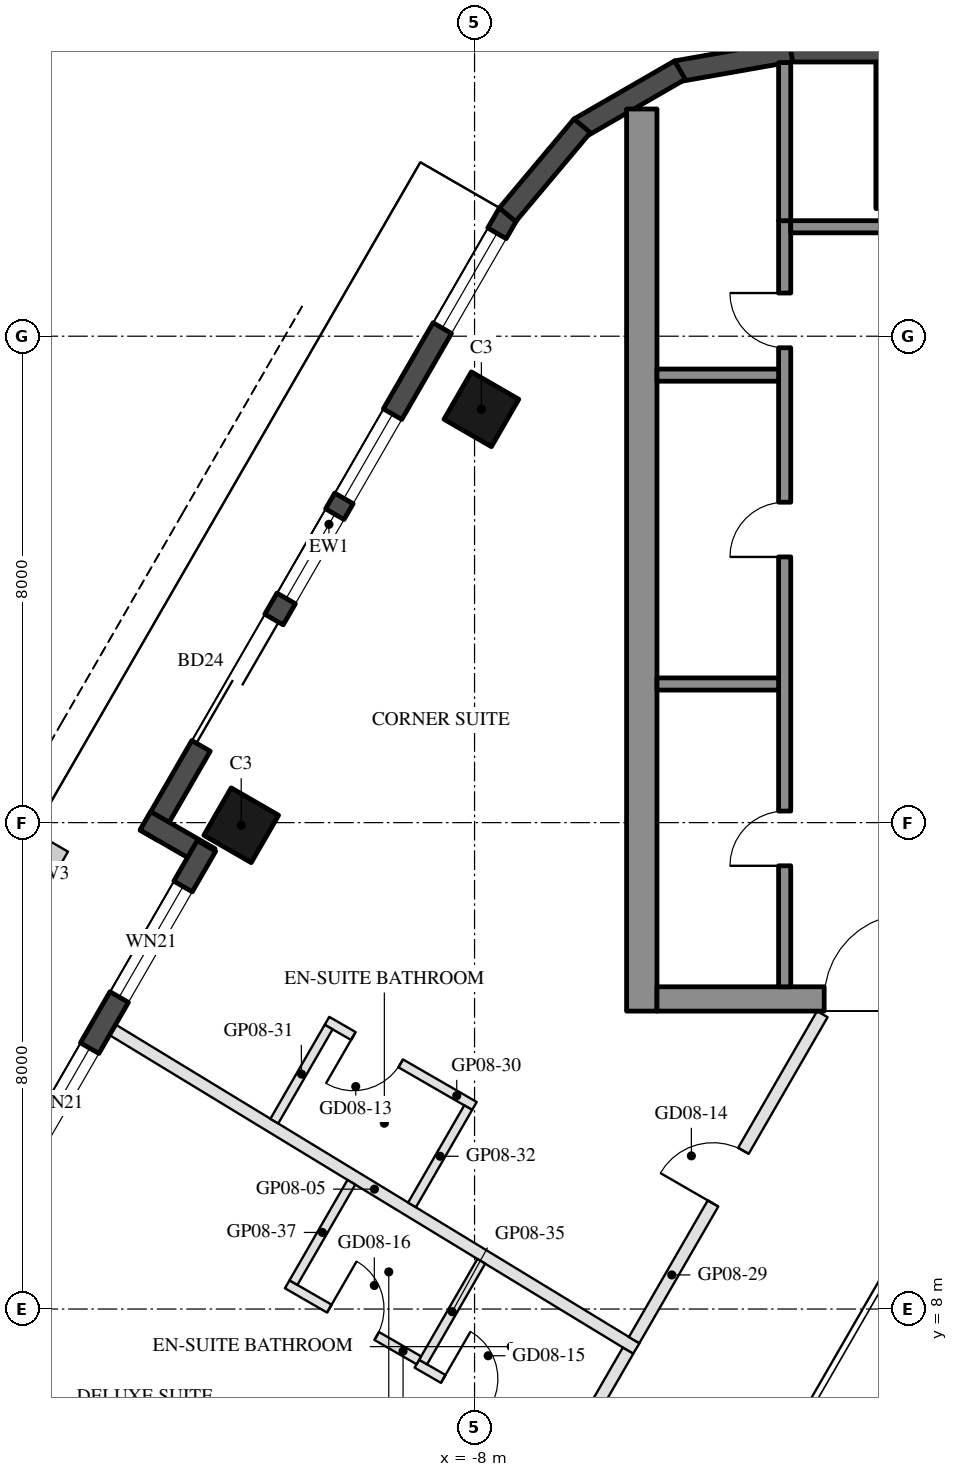
"""IFC4 building model, lengths in metres.
Left out: names, types, materials, properties, quantities, classifications, styles, units other than length and angle.
Written with IfcOpenShell. Run it as: python <this file> out.ifc"""

import sys

from ifc_helpers import new_model, si_unit, direction, frame, frame_2d, origin, origin_2d, place, context, subcontext, project, spatial, rectangle, hollow_rectangle, extrude, element, fill, save


model = new_model("IFC4")
c1 = context("Model", 3, precision=1e-05, world=origin(), true_north=direction((0.0, 1.0)))
c2 = subcontext(c1, "Body", "Model", "MODEL_VIEW")
j1 = project(units=[si_unit("LENGTHUNIT", "METRE"), si_unit("PLANEANGLEUNIT", "RADIAN")], contexts=[c1])
p1 = place(None, origin())
s1 = spatial("IfcSite", under=j1, at=p1, CompositionType="ELEMENT")
p2 = place(p1, origin())
s2 = spatial("IfcBuilding", under=s1, at=p2, CompositionType="ELEMENT")
p3 = place(p2, frame((0.0, 0.0, 102.0)))
s3 = spatial("IfcBuildingStorey", under=s2, at=p3, CompositionType="ELEMENT", Elevation=102.0)
for number, where, z_axis, x_axis in (
    (1, (-7.888, 22.798, 0.0), (0.0, 0.0, 1.0), (0.5, 0.866, 0.0)),
    (2, (-11.838, 15.957, 0.0), (0.0, 0.0, 1.0), (0.5, 0.866, 0.0)),
):
    element("IfcColumn", number, at=place(p3, frame(where, z_axis=z_axis, x_axis=x_axis)), inside=s3, PredefinedType="COLUMN", context=c2, shape_type="SweptSolid", body=[
        extrude(hollow_rectangle(XDim=0.9, YDim=0.9, WallThickness=0.04, at=origin_2d()), origin(), (0.0, 0.0, 1.0), 3.7),
    ])
p4 = place(p3, frame((0.0, 27.3, 0.0), z_axis=(0.0, 0.0, 1.0), x_axis=(1.0, 0.0, 0.0)))
e3 = element("IfcColumn", 3, at=p4, inside=s3, PredefinedType="COLUMN", context=c2, shape_type="SweptSolid", body=[
    extrude(hollow_rectangle(XDim=2.8, YDim=2.4, WallThickness=0.07, at=origin_2d()), origin(), (0.0, 0.0, 1.0), 3.7),
])
p5 = place(p3, frame((-7.441, 26.022, 0.0), z_axis=(0.0, 0.0, 1.0), x_axis=(-0.499992533062, -0.86602971478, 0.0)))
e4 = element("IfcWall", 4, at=p5, inside=s3, PredefinedType="SOLIDWALL", context=c2, shape_type="SweptSolid", body=[
    extrude(rectangle(XDim=11.816, YDim=0.35, at=frame_2d((5.908, 0.0))), origin(), (0.0, 0.0, 1.0), 3.55),
])
p6 = place(p5, frame((0.381, 0.0, 0.3)))
e5 = element("IfcOpeningElement", 5, at=p6, cuts=e4, PredefinedType="OPENING", context=c2, shape_type="SweptSolid", body=[
    extrude(rectangle(XDim=1.8, YDim=2.65, at=frame_2d((0.9, 1.325))), frame((0.0, 0.185, 0.0), z_axis=(0.0, -1.0, 0.0), x_axis=(1.0, 0.0, 0.0)), (0.0, 0.0, 1.0), 0.37),
])
p7 = place(p5, frame((7.716, 0.0, 0.0)))
e6 = element("IfcOpeningElement", 6, at=p7, cuts=e4, PredefinedType="OPENING", context=c2, shape_type="SweptSolid", body=[
    extrude(rectangle(XDim=2.4, YDim=2.4, at=frame_2d((1.2, 1.2))), frame((0.0, 0.185, 0.0), z_axis=(0.0, -1.0, 0.0), x_axis=(1.0, 0.0, 0.0)), (0.0, 0.0, 1.0), 0.37),
])
p8 = place(p5, frame((3.815, 0.0, 0.3)))
e7 = element("IfcOpeningElement", 7, at=p8, cuts=e4, PredefinedType="OPENING", context=c2, shape_type="SweptSolid", body=[
    extrude(rectangle(XDim=1.6, YDim=2.65, at=frame_2d((0.8, 1.325))), frame((0.0, 0.185, 0.0), z_axis=(0.0, -1.0, 0.0), x_axis=(1.0, 0.0, 0.0)), (0.0, 0.0, 1.0), 0.37),
])
p9 = place(p5, frame((5.715, 0.0, 0.3)))
e8 = element("IfcOpeningElement", 8, at=p9, cuts=e4, PredefinedType="OPENING", context=c2, shape_type="SweptSolid", body=[
    extrude(rectangle(XDim=1.6, YDim=2.65, at=frame_2d((0.8, 1.325))), frame((0.0, 0.185, 0.0), z_axis=(0.0, -1.0, 0.0), x_axis=(1.0, 0.0, 0.0)), (0.0, 0.0, 1.0), 0.37),
])
p10 = place(p3, frame((-13.413, 16.029, 0.0), z_axis=(0.0, 0.0, 1.0), x_axis=(0.866005645448, -0.500034220881, 0.0)))
e9 = element("IfcWall", 9, at=p10, inside=s3, PredefinedType="SOLIDWALL", context=c2, shape_type="SweptSolid", body=[
    extrude(rectangle(XDim=1.22, YDim=0.35, at=frame_2d((0.61, 0.0))), origin(), (0.0, 0.0, 1.0), 3.55),
])
p11 = place(p3, frame((-12.409, 15.617, 0.0), z_axis=(0.0, 0.0, 1.0), x_axis=(-0.500003597184, -0.866023326939, 0.0)))
e10 = element("IfcWall", 10, at=p11, inside=s3, PredefinedType="SOLIDWALL", context=c2, shape_type="SweptSolid", body=[
    extrude(rectangle(XDim=6.74, YDim=0.35, at=frame_2d((3.37, 0.0))), origin(), (0.0, 0.0, 1.0), 3.55),
])
p12 = place(p11, frame((0.77, 0.0, 0.3)))
e11 = element("IfcOpeningElement", 11, at=p12, cuts=e10, PredefinedType="OPENING", context=c2, shape_type="SweptSolid", body=[
    extrude(rectangle(XDim=2.1, YDim=2.65, at=frame_2d((1.05, 1.325))), frame((0.0, 0.185, 0.0), z_axis=(0.0, -1.0, 0.0), x_axis=(1.0, 0.0, 0.0)), (0.0, 0.0, 1.0), 0.37),
])
p13 = place(p11, frame((3.841, 0.0, 0.3)))
e12 = element("IfcOpeningElement", 12, at=p13, cuts=e10, PredefinedType="OPENING", context=c2, shape_type="SweptSolid", body=[
    extrude(rectangle(XDim=2.1, YDim=2.65, at=frame_2d((1.05, 1.325))), frame((0.0, 0.185, 0.0), z_axis=(0.0, -1.0, 0.0), x_axis=(1.0, 0.0, 0.0)), (0.0, 0.0, 1.0), 0.37),
])
p14 = place(p3, frame((2.829, 28.685, 0.0), z_axis=(0.0, 0.0, 1.0), x_axis=(-1.0, 0.0, 0.0)))
e13 = element("IfcWall", 13, at=p14, inside=s3, PredefinedType="SOLIDWALL", context=c2, shape_type="SweptSolid", body=[
    extrude(rectangle(XDim=5.658, YDim=0.35, at=frame_2d((2.829, 0.0))), origin(), (0.0, 0.0, 1.0), 3.55),
])
for number, where, z_axis, x_axis in (
    (14, (-2.799, 28.688, 0.0), (0.0, 0.0, 1.0), (-0.985, -0.174, 0.0)),
    (15, (-4.623, 28.377, 0.0), (0.0, 0.0, 1.0), (-0.866, -0.5, 0.0)),
):
    element("IfcWall", number, at=place(p3, frame(where, z_axis=z_axis, x_axis=x_axis)), inside=s3, PredefinedType="SOLIDWALL", context=c2, shape_type="SweptSolid", body=[
        extrude(rectangle(XDim=1.91, YDim=0.35, at=frame_2d((0.955, 0.0))), origin(), (0.0, 0.0, 1.0), 3.55),
    ])
p15 = place(p3, frame((-6.23, 27.461, 0.0), z_axis=(0.0, 0.0, 1.0), x_axis=(-0.642808304945, -0.766027077259, 0.0)))
e16 = element("IfcWall", 16, at=p15, inside=s3, PredefinedType="SOLIDWALL", context=c2, shape_type="SweptSolid", body=[
    extrude(rectangle(XDim=1.91, YDim=0.35, at=frame_2d((0.955, 0.0))), origin(), (0.0, 0.0, 1.0), 3.55),
])
p16 = place(p3, frame((-5.25, 12.9, 0.0), z_axis=(0.0, 0.0, 1.0), x_axis=(0.0, 1.0, 0.0)))
e17 = element("IfcWall", 17, at=p16, inside=s3, PredefinedType="SHEAR", context=c2, shape_type="SweptSolid", body=[
    extrude(rectangle(XDim=14.837, YDim=0.5, at=frame_2d((7.418, 0.0))), origin(), (0.0, 0.0, 1.0), 3.5),
])
p17 = place(p3, frame((5.0, 13.1, 0.0), z_axis=(0.0, 0.0, 1.0), x_axis=(-1.0, 0.0, 0.0)))
e18 = element("IfcWall", 18, at=p17, inside=s3, PredefinedType="SHEAR", context=c2, shape_type="SweptSolid", body=[
    extrude(rectangle(XDim=10.0, YDim=0.4, at=frame_2d((5.0, 0.0))), origin(), (0.0, 0.0, 1.0), 3.5),
])
p18 = place(p17, frame((3.55, 0.0, 0.0)))
e19 = element("IfcOpeningElement", 19, at=p18, cuts=e18, PredefinedType="OPENING", context=c2, shape_type="SweptSolid", body=[
    extrude(rectangle(XDim=1.1, YDim=2.1, at=frame_2d((0.55, 1.05))), frame((0.0, 0.21, 0.0), z_axis=(0.0, -1.0, 0.0), x_axis=(1.0, 0.0, 0.0)), (0.0, 0.0, 1.0), 0.42),
])
p19 = place(p17, frame((5.85, 0.0, 0.0)))
e20 = element("IfcOpeningElement", 20, at=p19, cuts=e18, PredefinedType="OPENING", context=c2, shape_type="SweptSolid", body=[
    extrude(rectangle(XDim=1.4, YDim=2.1, at=frame_2d((0.7, 1.05))), frame((0.0, 0.21, 0.0), z_axis=(0.0, -1.0, 0.0), x_axis=(1.0, 0.0, 0.0)), (0.0, 0.0, 1.0), 0.42),
])
p20 = place(p3, frame((-2.9, 13.3, 0.0), z_axis=(0.0, 0.0, 1.0), x_axis=(0.0, 1.0, 0.0)))
e21 = element("IfcWall", 21, at=p20, inside=s3, PredefinedType="SHEAR", context=c2, shape_type="SweptSolid", body=[
    extrude(rectangle(XDim=12.6, YDim=0.2, at=frame_2d((6.3, 0.0))), origin(), (0.0, 0.0, 1.0), 3.5),
])
p21 = place(p20, frame((1.99, 0.0, 0.0)))
e22 = element("IfcOpeningElement", 22, at=p21, cuts=e21, PredefinedType="OPENING", context=c2, shape_type="SweptSolid", body=[
    extrude(rectangle(XDim=0.9, YDim=2.1, at=frame_2d((0.45, 1.05))), frame((0.0, 0.11, 0.0), z_axis=(0.0, -1.0, 0.0), x_axis=(1.0, 0.0, 0.0)), (0.0, 0.0, 1.0), 0.22),
])
p22 = place(p20, frame((7.07, 0.0, 0.0)))
e23 = element("IfcOpeningElement", 23, at=p22, cuts=e21, PredefinedType="OPENING", context=c2, shape_type="SweptSolid", body=[
    extrude(rectangle(XDim=0.9, YDim=2.1, at=frame_2d((0.45, 1.05))), frame((0.0, 0.11, 0.0), z_axis=(0.0, -1.0, 0.0), x_axis=(1.0, 0.0, 0.0)), (0.0, 0.0, 1.0), 0.22),
])
p23 = place(p20, frame((10.51, 0.0, 0.0)))
e24 = element("IfcOpeningElement", 24, at=p23, cuts=e21, PredefinedType="OPENING", context=c2, shape_type="SweptSolid", body=[
    extrude(rectangle(XDim=0.9, YDim=2.1, at=frame_2d((0.45, 1.05))), frame((0.0, 0.11, 0.0), z_axis=(0.0, -1.0, 0.0), x_axis=(1.0, 0.0, 0.0)), (0.0, 0.0, 1.0), 0.22),
])
p24 = place(p3, frame((-0.4, 25.8, 0.0), z_axis=(0.0, 0.0, 1.0), x_axis=(-1.0, 0.0, 0.0)))
e25 = element("IfcWall", 25, at=p24, inside=s3, PredefinedType="SHEAR", context=c2, shape_type="SweptSolid", body=[
    extrude(rectangle(XDim=2.4, YDim=0.2, at=frame_2d((1.2, 0.0))), origin(), (0.0, 0.0, 1.0), 3.5),
])
for number, where, z_axis, x_axis in (
    (26, (-3.0, 18.28, 0.0), (0.0, 0.0, 1.0), (-1.0, 0.0, 0.0)),
    (27, (-3.0, 23.36, 0.0), (0.0, 0.0, 1.0), (-1.0, 0.0, 0.0)),
):
    element("IfcWall", number, at=place(p3, frame(where, z_axis=z_axis, x_axis=x_axis)), inside=s3, PredefinedType="SHEAR", context=c2, shape_type="SweptSolid", body=[
        extrude(rectangle(XDim=2.0, YDim=0.2, at=frame_2d((1.0, 0.0))), origin(), (0.0, 0.0, 1.0), 3.5),
    ])
p25 = place(p3, frame((-2.9, 25.9, 0.0), z_axis=(0.0, 0.0, 1.0), x_axis=(0.0, 1.0, 0.0)))
e28 = element("IfcWall", 28, at=p25, inside=s3, PredefinedType="SHEAR", context=c2, shape_type="SweptSolid", body=[
    extrude(rectangle(XDim=2.6, YDim=0.2, at=frame_2d((1.3, 0.0))), origin(), (0.0, 0.0, 1.0), 3.5),
])
p26 = place(p3, frame((-13.953, 12.593, 0.0), z_axis=(0.0, 0.0, 1.0), x_axis=(0.854198088033, -0.519947715065, 0.0)))
e29 = element("IfcWall", 29, at=p26, inside=s3, PredefinedType="PARTITIONING", context=c2, shape_type="SweptSolid", body=[
    extrude(rectangle(XDim=10.083, YDim=0.2, at=frame_2d((5.041, 0.0))), origin(), (0.0, 0.0, 1.0), 2.95),
])
p27 = place(p3, frame((-5.376, 7.489, 0.0), z_axis=(0.0, 0.0, 1.0), x_axis=(0.499998977725, 0.866025993994, 0.0)))
e30 = element("IfcWall", 30, at=p27, inside=s3, PredefinedType="PARTITIONING", context=c2, shape_type="SweptSolid", body=[
    extrude(rectangle(XDim=6.19, YDim=0.2, at=frame_2d((3.095, 0.0))), origin(), (0.0, 0.0, 1.0), 2.95),
])
p28 = place(p27, frame((2.595, 0.0, 0.0)))
e31 = element("IfcOpeningElement", 31, at=p28, cuts=e30, PredefinedType="OPENING", context=c2, shape_type="SweptSolid", body=[
    extrude(rectangle(XDim=1.0, YDim=2.1, at=frame_2d((0.5, 1.05))), frame((0.0, 0.11, 0.0), z_axis=(0.0, -1.0, 0.0), x_axis=(1.0, 0.0, 0.0)), (0.0, 0.0, 1.0), 0.22),
])
p29 = place(p3, frame((-8.002, 11.34, 0.0), z_axis=(0.0, 0.0, 1.0), x_axis=(-0.865996816683, 0.500049511043, 0.0)))
e32 = element("IfcWall", 32, at=p29, inside=s3, PredefinedType="PARTITIONING", context=c2, shape_type="SweptSolid", body=[
    extrude(rectangle(XDim=2.8, YDim=0.15, at=frame_2d((1.4, 0.0))), origin(), (0.0, 0.0, 1.0), 3.55),
])
p30 = place(p29, frame((1.4, 0.0, 0.0)))
e33 = element("IfcOpeningElement", 33, at=p30, cuts=e32, PredefinedType="OPENING", context=c2, shape_type="SweptSolid", body=[
    extrude(rectangle(XDim=0.9, YDim=2.1, at=frame_2d((0.45, 1.05))), frame((0.0, 0.085, 0.0), z_axis=(0.0, -1.0, 0.0), x_axis=(1.0, 0.0, 0.0)), (0.0, 0.0, 1.0), 0.17),
])
p31 = place(p3, frame((-10.399, 12.638, 0.0), z_axis=(0.0, 0.0, 1.0), x_axis=(-0.499974788625, -0.866039959089, 0.0)))
e34 = element("IfcWall", 34, at=p31, inside=s3, PredefinedType="PARTITIONING", context=c2, shape_type="SweptSolid", body=[
    extrude(rectangle(XDim=1.787, YDim=0.15, at=frame_2d((0.893, 0.0))), origin(), (0.0, 0.0, 1.0), 2.95),
])
p32 = place(p3, frame((-8.104, 11.313, 0.0), z_axis=(0.0, 0.0, 1.0), x_axis=(-0.499989263917, -0.866031602176, 0.0)))
e35 = element("IfcWall", 35, at=p32, inside=s3, PredefinedType="PARTITIONING", context=c2, shape_type="SweptSolid", body=[
    extrude(rectangle(XDim=1.848, YDim=0.15, at=frame_2d((0.924, 0.0))), origin(), (0.0, 0.0, 1.0), 2.95),
])
p33 = place(p3, frame((-9.326, 0.647, 0.0), z_axis=(0.0, 0.0, 1.0), x_axis=(0.499982277793, 0.866035635464, 0.0)))
e36 = element("IfcWall", 36, at=p33, inside=s3, PredefinedType="PARTITIONING", context=c2, shape_type="SweptSolid", body=[
    extrude(rectangle(XDim=7.7, YDim=0.2, at=frame_2d((3.85, 0.0))), origin(), (0.0, 0.0, 1.0), 2.95),
])
p34 = place(p33, frame((4.252, 0.0, 0.0)))
e37 = element("IfcOpeningElement", 37, at=p34, cuts=e36, PredefinedType="OPENING", context=c2, shape_type="SweptSolid", body=[
    extrude(rectangle(XDim=1.0, YDim=2.1, at=frame_2d((0.5, 1.05))), frame((0.0, 0.11, 0.0), z_axis=(0.0, -1.0, 0.0), x_axis=(1.0, 0.0, 0.0)), (0.0, 0.0, 1.0), 0.22),
])
p35 = place(p3, frame((-8.948, 7.101, 0.0), z_axis=(0.0, 0.0, 1.0), x_axis=(0.866034573852, -0.49998411664, 0.0)))
e38 = element("IfcWall", 38, at=p35, inside=s3, PredefinedType="PARTITIONING", context=c2, shape_type="SweptSolid", body=[
    extrude(rectangle(XDim=2.8, YDim=0.15, at=frame_2d((1.4, 0.0))), origin(), (0.0, 0.0, 1.0), 3.55),
])
p36 = place(p35, frame((0.5, 0.0, 0.0)))
e39 = element("IfcOpeningElement", 39, at=p36, cuts=e38, PredefinedType="OPENING", context=c2, shape_type="SweptSolid", body=[
    extrude(rectangle(XDim=0.9, YDim=2.1, at=frame_2d((0.45, 1.05))), frame((0.0, 0.085, 0.0), z_axis=(0.0, -1.0, 0.0), x_axis=(1.0, 0.0, 0.0)), (0.0, 0.0, 1.0), 0.17),
])
p37 = place(p3, frame((-7.89, 8.785, 0.0), z_axis=(0.0, 0.0, 1.0), x_axis=(-0.499954417993, -0.866051718969, 0.0)))
e40 = element("IfcWall", 40, at=p37, inside=s3, PredefinedType="PARTITIONING", context=c2, shape_type="SweptSolid", body=[
    extrude(rectangle(XDim=1.913, YDim=0.15, at=frame_2d((0.957, 0.0))), origin(), (0.0, 0.0, 1.0), 3.55),
])
p38 = place(p3, frame((-11.081, 8.407, 0.0), z_axis=(0.0, 0.0, 1.0), x_axis=(0.866047370643, -0.499961950354, 0.0)))
e41 = element("IfcWall", 41, at=p38, inside=s3, PredefinedType="PARTITIONING", context=c2, shape_type="SweptSolid", body=[
    extrude(rectangle(XDim=2.5, YDim=0.15, at=frame_2d((1.25, 0.0))), origin(), (0.0, 0.0, 1.0), 3.55),
])
p39 = place(p38, frame((0.8, 0.0, 0.0)))
e42 = element("IfcOpeningElement", 42, at=p39, cuts=e41, PredefinedType="OPENING", context=c2, shape_type="SweptSolid", body=[
    extrude(rectangle(XDim=0.9, YDim=2.1, at=frame_2d((0.45, 1.05))), frame((0.0, 0.085, 0.0), z_axis=(0.0, -1.0, 0.0), x_axis=(1.0, 0.0, 0.0)), (0.0, 0.0, 1.0), 0.17),
])
p40 = place(p3, frame((-10.026, 10.085, 0.0), z_axis=(0.0, 0.0, 1.0), x_axis=(-0.49999591573, -0.866027761826, 0.0)))
e43 = element("IfcWall", 43, at=p40, inside=s3, PredefinedType="PARTITIONING", context=c2, shape_type="SweptSolid", body=[
    extrude(rectangle(XDim=1.906, YDim=0.15, at=frame_2d((0.953, 0.0))), origin(), (0.0, 0.0, 1.0), 3.55),
])
p41 = place(p6, origin())
e44 = element("IfcWindow", 44, at=p41, inside=s3, PartitioningType="SINGLE_PANEL", PredefinedType="WINDOW", context=c2, shape_type="SweptSolid", body=[
    extrude(rectangle(XDim=1.8, YDim=2.65, at=frame_2d((0.9, 1.325))), frame((0.0, 0.03, 0.0), z_axis=(0.0, -1.0, 0.0), x_axis=(1.0, 0.0, 0.0)), (0.0, 0.0, 1.0), 0.06),
])
fill(e5, e44)
p42 = place(p7, frame((2.4, 0.0, 0.0), z_axis=(0.0, 0.0, 1.0), x_axis=(-1.0, 0.0, 0.0)))
e45 = element("IfcDoor", 45, at=p42, inside=s3, OperationType="SLIDING_TO_LEFT", PredefinedType="DOOR", context=c2, shape_type="SweptSolid", body=[
    extrude(rectangle(XDim=2.4, YDim=2.4, at=frame_2d((1.2, 1.2))), frame((0.0, 0.025, 0.0), z_axis=(0.0, -1.0, 0.0), x_axis=(1.0, 0.0, 0.0)), (0.0, 0.0, 1.0), 0.05),
])
fill(e6, e45)
p43 = place(p8, origin())
e46 = element("IfcWindow", 46, at=p43, inside=s3, PartitioningType="SINGLE_PANEL", PredefinedType="WINDOW", context=c2, shape_type="SweptSolid", body=[
    extrude(rectangle(XDim=1.6, YDim=2.65, at=frame_2d((0.8, 1.325))), frame((0.0, 0.03, 0.0), z_axis=(0.0, -1.0, 0.0), x_axis=(1.0, 0.0, 0.0)), (0.0, 0.0, 1.0), 0.06),
])
fill(e7, e46)
p44 = place(p9, origin())
e47 = element("IfcWindow", 47, at=p44, inside=s3, PartitioningType="SINGLE_PANEL", PredefinedType="WINDOW", context=c2, shape_type="SweptSolid", body=[
    extrude(rectangle(XDim=1.6, YDim=2.65, at=frame_2d((0.8, 1.325))), frame((0.0, 0.03, 0.0), z_axis=(0.0, -1.0, 0.0), x_axis=(1.0, 0.0, 0.0)), (0.0, 0.0, 1.0), 0.06),
])
fill(e8, e47)
p45 = place(p12, origin())
e48 = element("IfcWindow", 48, at=p45, inside=s3, PartitioningType="SINGLE_PANEL", PredefinedType="WINDOW", context=c2, shape_type="SweptSolid", body=[
    extrude(rectangle(XDim=2.1, YDim=2.65, at=frame_2d((1.05, 1.325))), frame((0.0, 0.03, 0.0), z_axis=(0.0, -1.0, 0.0), x_axis=(1.0, 0.0, 0.0)), (0.0, 0.0, 1.0), 0.06),
])
fill(e11, e48)
p46 = place(p13, origin())
e49 = element("IfcWindow", 49, at=p46, inside=s3, PartitioningType="SINGLE_PANEL", PredefinedType="WINDOW", context=c2, shape_type="SweptSolid", body=[
    extrude(rectangle(XDim=2.1, YDim=2.65, at=frame_2d((1.05, 1.325))), frame((0.0, 0.03, 0.0), z_axis=(0.0, -1.0, 0.0), x_axis=(1.0, 0.0, 0.0)), (0.0, 0.0, 1.0), 0.06),
])
fill(e12, e49)
p47 = place(p21, origin())
e50 = element("IfcDoor", 50, at=p47, inside=s3, OperationType="SINGLE_SWING_LEFT", PredefinedType="DOOR", context=c2, shape_type="SweptSolid", body=[
    extrude(rectangle(XDim=0.9, YDim=2.1, at=frame_2d((0.45, 1.05))), frame((0.0, 0.025, 0.0), z_axis=(0.0, -1.0, 0.0), x_axis=(1.0, 0.0, 0.0)), (0.0, 0.0, 1.0), 0.05),
])
fill(e22, e50)
p48 = place(p22, origin())
e51 = element("IfcDoor", 51, at=p48, inside=s3, OperationType="SINGLE_SWING_LEFT", PredefinedType="DOOR", context=c2, shape_type="SweptSolid", body=[
    extrude(rectangle(XDim=0.9, YDim=2.1, at=frame_2d((0.45, 1.05))), frame((0.0, 0.025, 0.0), z_axis=(0.0, -1.0, 0.0), x_axis=(1.0, 0.0, 0.0)), (0.0, 0.0, 1.0), 0.05),
])
fill(e23, e51)
p49 = place(p23, origin())
e52 = element("IfcDoor", 52, at=p49, inside=s3, OperationType="SINGLE_SWING_RIGHT", PredefinedType="DOOR", context=c2, shape_type="SweptSolid", body=[
    extrude(rectangle(XDim=0.9, YDim=2.1, at=frame_2d((0.45, 1.05))), frame((0.0, 0.025, 0.0), z_axis=(0.0, -1.0, 0.0), x_axis=(1.0, 0.0, 0.0)), (0.0, 0.0, 1.0), 0.05),
])
fill(e24, e52)
p50 = place(p19, frame((1.4, 0.0, 0.0), z_axis=(0.0, 0.0, 1.0), x_axis=(-1.0, 0.0, 0.0)))
e53 = element("IfcDoor", 53, at=p50, inside=s3, OperationType="DOUBLE_DOOR_SINGLE_SWING", PredefinedType="DOOR", context=c2, shape_type="SweptSolid", body=[
    extrude(rectangle(XDim=1.4, YDim=2.1, at=frame_2d((0.7, 1.05))), frame((0.0, 0.025, 0.0), z_axis=(0.0, -1.0, 0.0), x_axis=(1.0, 0.0, 0.0)), (0.0, 0.0, 1.0), 0.05),
])
fill(e20, e53)
p51 = place(p30, origin())
e54 = element("IfcDoor", 54, at=p51, inside=s3, OperationType="SINGLE_SWING_RIGHT", PredefinedType="DOOR", context=c2, shape_type="SweptSolid", body=[
    extrude(rectangle(XDim=0.9, YDim=2.1, at=frame_2d((0.45, 1.05))), frame((0.0, 0.025, 0.0), z_axis=(0.0, -1.0, 0.0), x_axis=(1.0, 0.0, 0.0)), (0.0, 0.0, 1.0), 0.05),
])
fill(e33, e54)
p52 = place(p28, origin())
e55 = element("IfcDoor", 55, at=p52, inside=s3, OperationType="SINGLE_SWING_LEFT", PredefinedType="DOOR", context=c2, shape_type="SweptSolid", body=[
    extrude(rectangle(XDim=1.0, YDim=2.1, at=frame_2d((0.5, 1.05))), frame((0.0, 0.025, 0.0), z_axis=(0.0, -1.0, 0.0), x_axis=(1.0, 0.0, 0.0)), (0.0, 0.0, 1.0), 0.05),
])
fill(e31, e55)
p53 = place(p36, origin())
e56 = element("IfcDoor", 56, at=p53, inside=s3, OperationType="SINGLE_SWING_LEFT", PredefinedType="DOOR", context=c2, shape_type="SweptSolid", body=[
    extrude(rectangle(XDim=0.9, YDim=2.1, at=frame_2d((0.45, 1.05))), frame((0.0, 0.025, 0.0), z_axis=(0.0, -1.0, 0.0), x_axis=(1.0, 0.0, 0.0)), (0.0, 0.0, 1.0), 0.05),
])
fill(e39, e56)
p54 = place(p39, origin())
e57 = element("IfcDoor", 57, at=p54, inside=s3, OperationType="SINGLE_SWING_LEFT", PredefinedType="DOOR", context=c2, shape_type="SweptSolid", body=[
    extrude(rectangle(XDim=0.9, YDim=2.1, at=frame_2d((0.45, 1.05))), frame((0.0, 0.025, 0.0), z_axis=(0.0, -1.0, 0.0), x_axis=(1.0, 0.0, 0.0)), (0.0, 0.0, 1.0), 0.05),
])
fill(e42, e57)
save(model, sys.argv[1])
